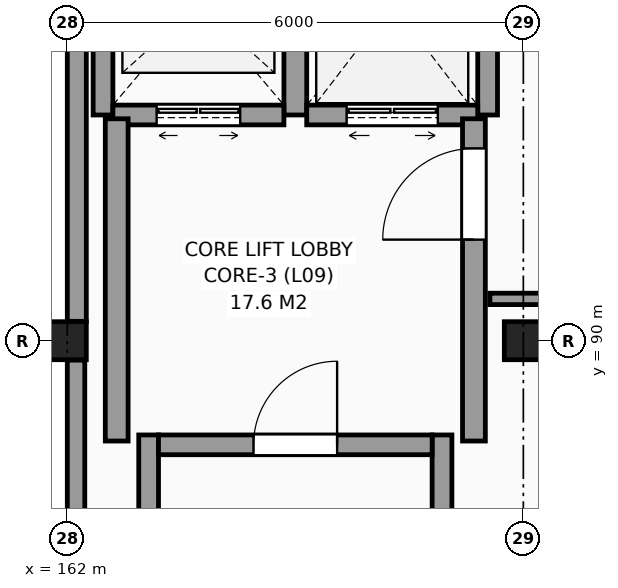
"""IFC4 building model, lengths in metres.
Left out: names, types, materials, properties, quantities, classifications, styles, units other than length and angle.
Written with IfcOpenShell. Run it as: python <this file> out.ifc"""

import sys

from ifc_helpers import new_model, si_unit, direction, frame, frame_2d, origin, origin_2d, place, context, subcontext, project, spatial, rectangle, extrude, element, fill, save


model = new_model("IFC4")
c1 = context("Model", 3, precision=1e-05, world=origin(), true_north=direction((0.0, 1.0)))
c2 = subcontext(c1, "Body", "Model", "MODEL_VIEW")
j1 = project(units=[si_unit("LENGTHUNIT", "METRE"), si_unit("PLANEANGLEUNIT", "RADIAN")], contexts=[c1])
p1 = place(None, origin())
s1 = spatial("IfcSite", under=j1, at=p1, CompositionType="ELEMENT")
p2 = place(p1, origin())
s2 = spatial("IfcBuilding", under=s1, at=p2, CompositionType="ELEMENT")
p3 = place(p2, frame((0.0, 0.0, 38.1)))
s3 = spatial("IfcBuildingStorey", under=s2, at=p3, CompositionType="ELEMENT", Elevation=38.1)
for number, where, z_axis, x_axis in (
    (1, (162.0, 90.0, 0.0), (0.0, 0.0, 1.0), (1.0, 0.0, 0.0)),
    (2, (168.0, 90.0, 0.0), (0.0, 0.0, 1.0), (1.0, 0.0, 0.0)),
):
    element("IfcColumn", number, at=place(p3, frame(where, z_axis=z_axis, x_axis=x_axis)), inside=s3, PredefinedType="COLUMN", context=c2, shape_type="SweptSolid", body=[
        extrude(rectangle(XDim=0.5, YDim=0.5, at=origin_2d()), origin(), (0.0, 0.0, 1.0), 3.3),
    ])
p4 = place(p3, frame((162.125, 95.745, 0.0), z_axis=(0.0, 0.0, 1.0), x_axis=(0.0, -1.0, 0.0)))
e3 = element("IfcWall", 3, at=p4, inside=s3, PredefinedType="SOLIDWALL", context=c2, shape_type="SweptSolid", body=[
    extrude(rectangle(XDim=5.49, YDim=0.25, at=frame_2d((2.745, 0.0))), origin(), (0.0, 0.0, 1.0), 2.41),
])
p5 = place(p3, frame((162.115, 89.745, 0.0), z_axis=(0.0, 0.0, 1.0), x_axis=(0.0, -1.0, 0.0)))
e4 = element("IfcWall", 4, at=p5, inside=s3, PredefinedType="SOLIDWALL", context=c2, shape_type="SweptSolid", body=[
    extrude(rectangle(XDim=5.49, YDim=0.23, at=frame_2d((2.745, 0.0))), origin(), (0.0, 0.0, 1.0), 2.41),
])
for number, where, z_axis, x_axis in (
    (5, (163.07, 78.04, 0.0), (0.0, 0.0, 1.0), (0.0, 1.0, 0.0)),
    (6, (166.93, 78.04, 0.0), (0.0, 0.0, 1.0), (0.0, 1.0, 0.0)),
):
    element("IfcWall", number, at=place(p3, frame(where, z_axis=z_axis, x_axis=x_axis)), inside=s3, PredefinedType="SHEAR", context=c2, shape_type="SweptSolid", body=[
        extrude(rectangle(XDim=10.72, YDim=0.26, at=frame_2d((5.36, 0.0))), origin(), (0.0, 0.0, 1.0), 3.3),
    ])
p6 = place(p3, frame((163.2, 88.63, 0.0), z_axis=(0.0, 0.0, 1.0), x_axis=(1.0, 0.0, 0.0)))
e7 = element("IfcWall", 7, at=p6, inside=s3, PredefinedType="SHEAR", context=c2, shape_type="SweptSolid", body=[
    extrude(rectangle(XDim=3.6, YDim=0.26, at=frame_2d((1.8, 0.0))), origin(), (0.0, 0.0, 1.0), 3.3),
])
p7 = place(p6, frame((1.25, 0.0, 0.0)))
e8 = element("IfcOpeningElement", 8, at=p7, cuts=e7, PredefinedType="OPENING", context=c2, shape_type="SweptSolid", body=[
    extrude(rectangle(XDim=1.1, YDim=2.15, at=frame_2d((0.55, 1.075))), frame((0.0, 0.14, 0.0), z_axis=(0.0, -1.0, 0.0), x_axis=(1.0, 0.0, 0.0)), (0.0, 0.0, 1.0), 0.28),
])
p8 = place(p3, frame((162.47, 92.97, 0.0), z_axis=(0.0, 0.0, 1.0), x_axis=(0.0, 1.0, 0.0)))
e9 = element("IfcWall", 9, at=p8, inside=s3, PredefinedType="SHEAR", context=c2, shape_type="SweptSolid", body=[
    extrude(rectangle(XDim=2.91, YDim=0.26, at=frame_2d((1.455, 0.0))), origin(), (0.0, 0.0, 1.0), 3.3),
])
p9 = place(p3, frame((165.0, 92.97, 0.0), z_axis=(0.0, 0.0, 1.0), x_axis=(0.0, 1.0, 0.0)))
e10 = element("IfcWall", 10, at=p9, inside=s3, PredefinedType="SHEAR", context=c2, shape_type="SweptSolid", body=[
    extrude(rectangle(XDim=2.91, YDim=0.3, at=frame_2d((1.455, 0.0))), origin(), (0.0, 0.0, 1.0), 3.3),
])
p10 = place(p3, frame((162.6, 92.97, 0.0), z_axis=(0.0, 0.0, 1.0), x_axis=(1.0, 0.0, 0.0)))
e11 = element("IfcWall", 11, at=p10, inside=s3, PredefinedType="SHEAR", context=c2, shape_type="SweptSolid", body=[
    extrude(rectangle(XDim=2.25, YDim=0.26, at=frame_2d((1.125, 0.0))), origin(), (0.0, 0.0, 1.0), 3.3),
])
p11 = place(p10, frame((0.575, 0.0, 0.0)))
e12 = element("IfcOpeningElement", 12, at=p11, cuts=e11, PredefinedType="OPENING", context=c2, shape_type="SweptSolid", body=[
    extrude(rectangle(XDim=1.1, YDim=2.2, at=frame_2d((0.55, 1.1))), frame((0.0, 0.14, 0.0), z_axis=(0.0, -1.0, 0.0), x_axis=(1.0, 0.0, 0.0)), (0.0, 0.0, 1.0), 0.28),
])
p12 = place(p3, frame((167.53, 92.97, 0.0), z_axis=(0.0, 0.0, 1.0), x_axis=(0.0, 1.0, 0.0)))
e13 = element("IfcWall", 13, at=p12, inside=s3, PredefinedType="SHEAR", context=c2, shape_type="SweptSolid", body=[
    extrude(rectangle(XDim=2.91, YDim=0.26, at=frame_2d((1.455, 0.0))), origin(), (0.0, 0.0, 1.0), 3.3),
])
p13 = place(p3, frame((165.15, 92.97, 0.0), z_axis=(0.0, 0.0, 1.0), x_axis=(1.0, 0.0, 0.0)))
e14 = element("IfcWall", 14, at=p13, inside=s3, PredefinedType="SHEAR", context=c2, shape_type="SweptSolid", body=[
    extrude(rectangle(XDim=2.25, YDim=0.26, at=frame_2d((1.125, 0.0))), origin(), (0.0, 0.0, 1.0), 3.3),
])
p14 = place(p13, frame((0.525, 0.0, 0.0)))
e15 = element("IfcOpeningElement", 15, at=p14, cuts=e14, PredefinedType="OPENING", context=c2, shape_type="SweptSolid", body=[
    extrude(rectangle(XDim=1.2, YDim=2.25, at=frame_2d((0.6, 1.125))), frame((0.0, 0.14, 0.0), z_axis=(0.0, -1.0, 0.0), x_axis=(1.0, 0.0, 0.0)), (0.0, 0.0, 1.0), 0.28),
])
p15 = place(p3, frame((167.35, 88.68, 0.0), z_axis=(0.0, 0.0, 1.0), x_axis=(0.0, 1.0, 0.0)))
e16 = element("IfcWall", 16, at=p15, inside=s3, PredefinedType="SHEAR", context=c2, shape_type="SweptSolid", body=[
    extrude(rectangle(XDim=4.24, YDim=0.3, at=frame_2d((2.12, 0.0))), origin(), (0.0, 0.0, 1.0), 3.3),
])
p16 = place(p15, frame((2.65, 0.0, 0.0)))
e17 = element("IfcOpeningElement", 17, at=p16, cuts=e16, PredefinedType="OPENING", context=c2, shape_type="SweptSolid", body=[
    extrude(rectangle(XDim=1.2, YDim=2.2, at=frame_2d((0.6, 1.1))), frame((0.0, 0.16, 0.0), z_axis=(0.0, -1.0, 0.0), x_axis=(1.0, 0.0, 0.0)), (0.0, 0.0, 1.0), 0.32),
])
p17 = place(p3, frame((162.65, 88.68, 0.0), z_axis=(0.0, 0.0, 1.0), x_axis=(0.0, 1.0, 0.0)))
e18 = element("IfcWall", 18, at=p17, inside=s3, PredefinedType="SHEAR", context=c2, shape_type="SweptSolid", body=[
    extrude(rectangle(XDim=4.24, YDim=0.3, at=frame_2d((2.12, 0.0))), origin(), (0.0, 0.0, 1.0), 3.3),
])
p18 = place(p3, frame((167.56, 90.55, 0.0), z_axis=(0.0, 0.0, 1.0), x_axis=(1.0, 0.0, 0.0)))
e19 = element("IfcWall", 19, at=p18, inside=s3, PredefinedType="PARTITIONING", context=c2, shape_type="SweptSolid", body=[
    extrude(rectangle(XDim=2.24, YDim=0.15, at=frame_2d((1.12, 0.0))), origin(), (0.0, 0.0, 1.0), 3.06),
])
p19 = place(p7, origin())
e20 = element("IfcDoor", 20, at=p19, inside=s3, OperationType="SINGLE_SWING_RIGHT", PredefinedType="DOOR", context=c2, shape_type="SweptSolid", body=[
    extrude(rectangle(XDim=1.1, YDim=2.15, at=frame_2d((0.55, 1.075))), frame((0.0, 0.025, 0.0), z_axis=(0.0, -1.0, 0.0), x_axis=(1.0, 0.0, 0.0)), (0.0, 0.0, 1.0), 0.05),
])
fill(e8, e20)
p20 = place(p11, origin())
e21 = element("IfcDoor", 21, at=p20, inside=s3, OperationType="DOUBLE_DOOR_SLIDING", PredefinedType="DOOR", context=c2, shape_type="SweptSolid", body=[
    extrude(rectangle(XDim=1.1, YDim=2.2, at=frame_2d((0.55, 1.1))), frame((0.0, 0.025, 0.0), z_axis=(0.0, -1.0, 0.0), x_axis=(1.0, 0.0, 0.0)), (0.0, 0.0, 1.0), 0.05),
])
fill(e12, e21)
p21 = place(p14, origin())
e22 = element("IfcDoor", 22, at=p21, inside=s3, OperationType="DOUBLE_DOOR_SLIDING", PredefinedType="DOOR", context=c2, shape_type="SweptSolid", body=[
    extrude(rectangle(XDim=1.2, YDim=2.25, at=frame_2d((0.6, 1.125))), frame((0.0, 0.025, 0.0), z_axis=(0.0, -1.0, 0.0), x_axis=(1.0, 0.0, 0.0)), (0.0, 0.0, 1.0), 0.05),
])
fill(e15, e22)
p22 = place(p16, origin())
e23 = element("IfcDoor", 23, at=p22, inside=s3, OperationType="SINGLE_SWING_LEFT", PredefinedType="DOOR", context=c2, shape_type="SweptSolid", body=[
    extrude(rectangle(XDim=1.2, YDim=2.2, at=frame_2d((0.6, 1.1))), frame((0.0, 0.025, 0.0), z_axis=(0.0, -1.0, 0.0), x_axis=(1.0, 0.0, 0.0)), (0.0, 0.0, 1.0), 0.05),
])
fill(e17, e23)
save(model, sys.argv[1])
